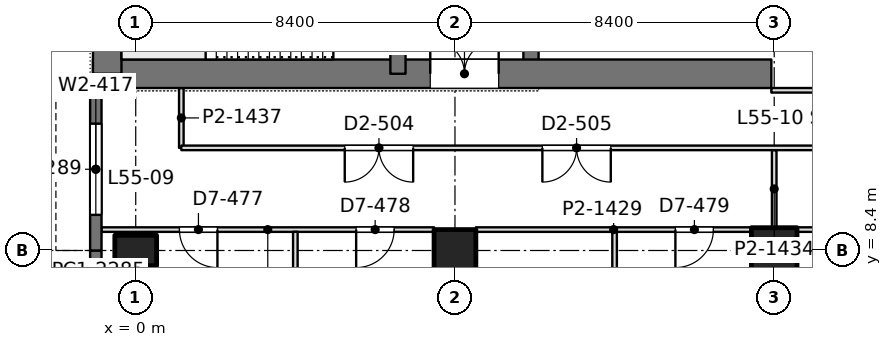
"""IFC4 building model, lengths in metres.
Left out: names, types, materials, properties, quantities, classifications, styles, units other than length and angle.
Written with IfcOpenShell. Run it as: python <this file> out.ifc"""

import sys

from ifc_helpers import new_model, si_unit, direction, frame, frame_2d, origin, origin_2d, place, context, subcontext, project, spatial, rectangle, extrude, element, fill, save


model = new_model("IFC4")
c1 = context("Model", 3, precision=1e-05, world=origin(), true_north=direction((0.0, 1.0)))
c2 = subcontext(c1, "Body", "Model", "MODEL_VIEW")
j1 = project(units=[si_unit("LENGTHUNIT", "METRE"), si_unit("PLANEANGLEUNIT", "RADIAN")], contexts=[c1])
p1 = place(None, origin())
s1 = spatial("IfcSite", under=j1, at=p1, CompositionType="ELEMENT")
p2 = place(p1, origin())
s2 = spatial("IfcBuilding", under=s1, at=p2, CompositionType="ELEMENT")
p3 = place(p2, frame((0.0, 0.0, 240.6)))
s3 = spatial("IfcBuildingStorey", under=s2, at=p3, CompositionType="ELEMENT", Elevation=240.6)
p4 = place(p3, frame((0.0, 8.4, 0.0), z_axis=(0.0, 0.0, 1.0), x_axis=(0.0, 1.0, 0.0)))
e1 = element("IfcColumn", 1, at=p4, inside=s3, PredefinedType="COLUMN", context=c2, shape_type="SweptSolid", body=[
    extrude(rectangle(XDim=0.8, YDim=1.1, at=origin_2d()), origin(), (0.0, 0.0, 1.0), 4.2),
])
p5 = place(p3, frame((8.4, 8.4, 0.0), z_axis=(0.0, 0.0, 1.0), x_axis=(1.0, 0.0, 0.0)))
e2 = element("IfcColumn", 2, at=p5, inside=s3, PredefinedType="COLUMN", context=c2, shape_type="SweptSolid", body=[
    extrude(rectangle(XDim=1.1, YDim=1.1, at=origin_2d()), origin(), (0.0, 0.0, 1.0), 4.2),
])
p6 = place(p3, frame((16.8, 8.4, 0.0), z_axis=(0.0, 0.0, 1.0), x_axis=(1.0, 0.0, 0.0)))
e3 = element("IfcColumn", 3, at=p6, inside=s3, PredefinedType="COLUMN", context=c2, shape_type="SweptSolid", body=[
    extrude(rectangle(XDim=1.2, YDim=1.2, at=origin_2d()), origin(), (0.0, 0.0, 1.0), 4.2),
])
p7 = place(p3, frame((-1.125, 13.05, 0.0), z_axis=(0.0, 0.0, 1.0), x_axis=(1.0, 0.0, 0.0)))
e4 = element("IfcWall", 4, at=p7, inside=s3, PredefinedType="SHEAR", context=c2, shape_type="SweptSolid", body=[
    extrude(rectangle(XDim=17.85, YDim=0.75, at=frame_2d((8.925, 0.0))), origin(), (0.0, 0.0, 1.0), 4.2),
])
p8 = place(p7, frame((8.875, 0.0, 0.0)))
e5 = element("IfcOpeningElement", 5, at=p8, cuts=e4, PredefinedType="OPENING", context=c2, shape_type="SweptSolid", body=[
    extrude(rectangle(XDim=1.8, YDim=2.4, at=frame_2d((0.9, 1.2))), frame((0.0, 0.385, 0.0), z_axis=(0.0, -1.0, 0.0), x_axis=(1.0, 0.0, 0.0)), (0.0, 0.0, 1.0), 0.77),
])
p9 = place(p3, frame((-0.75, 13.05, 0.0), z_axis=(0.0, 0.0, 1.0), x_axis=(0.0, 1.0, 0.0)))
e6 = element("IfcWall", 6, at=p9, inside=s3, PredefinedType="SHEAR", context=c2, shape_type="SweptSolid", body=[
    extrude(rectangle(XDim=24.3, YDim=0.75, at=frame_2d((12.15, 0.0))), origin(), (0.0, 0.0, 1.0), 4.2),
])
p10 = place(p3, frame((6.9, 13.05, 0.0), z_axis=(0.0, 0.0, 1.0), x_axis=(0.0, 1.0, 0.0)))
e7 = element("IfcWall", 7, at=p10, inside=s3, PredefinedType="SHEAR", context=c2, shape_type="SweptSolid", body=[
    extrude(rectangle(XDim=24.3, YDim=0.4, at=frame_2d((12.15, 0.0))), origin(), (0.0, 0.0, 1.0), 4.2),
])
p11 = place(p10, frame((1.3, 0.0, 0.0)))
e8 = element("IfcOpeningElement", 8, at=p11, cuts=e7, PredefinedType="OPENING", context=c2, shape_type="SweptSolid", body=[
    extrude(rectangle(XDim=1.0, YDim=2.2, at=frame_2d((0.5, 1.1))), frame((0.0, 0.21, 0.0), z_axis=(0.0, -1.0, 0.0), x_axis=(1.0, 0.0, 0.0)), (0.0, 0.0, 1.0), 0.42),
])
p12 = place(p10, frame((22.0, 0.0, 0.0)))
e9 = element("IfcOpeningElement", 9, at=p12, cuts=e7, PredefinedType="OPENING", context=c2, shape_type="SweptSolid", body=[
    extrude(rectangle(XDim=1.0, YDim=2.2, at=frame_2d((0.5, 1.1))), frame((0.0, 0.21, 0.0), z_axis=(0.0, -1.0, 0.0), x_axis=(1.0, 0.0, 0.0)), (0.0, 0.0, 1.0), 0.42),
])
p13 = place(p10, frame((5.55, 0.0, 0.0)))
e10 = element("IfcOpeningElement", 10, at=p13, cuts=e7, PredefinedType="OPENING", context=c2, shape_type="SweptSolid", body=[
    extrude(rectangle(XDim=1.0, YDim=2.2, at=frame_2d((0.5, 1.1))), frame((0.0, 0.21, 0.0), z_axis=(0.0, -1.0, 0.0), x_axis=(1.0, 0.0, 0.0)), (0.0, 0.0, 1.0), 0.42),
])
p14 = place(p10, frame((9.55, 0.0, 0.0)))
e11 = element("IfcOpeningElement", 11, at=p14, cuts=e7, PredefinedType="OPENING", context=c2, shape_type="SweptSolid", body=[
    extrude(rectangle(XDim=1.0, YDim=2.2, at=frame_2d((0.5, 1.1))), frame((0.0, 0.21, 0.0), z_axis=(0.0, -1.0, 0.0), x_axis=(1.0, 0.0, 0.0)), (0.0, 0.0, 1.0), 0.42),
])
p15 = place(p10, frame((12.8, 0.0, 0.0)))
e12 = element("IfcOpeningElement", 12, at=p15, cuts=e7, PredefinedType="OPENING", context=c2, shape_type="SweptSolid", body=[
    extrude(rectangle(XDim=1.1, YDim=2.2, at=frame_2d((0.55, 1.1))), frame((0.0, 0.21, 0.0), z_axis=(0.0, -1.0, 0.0), x_axis=(1.0, 0.0, 0.0)), (0.0, 0.0, 1.0), 0.42),
])
p16 = place(p10, frame((15.538, 0.0, 0.0)))
e13 = element("IfcOpeningElement", 13, at=p16, cuts=e7, PredefinedType="OPENING", context=c2, shape_type="SweptSolid", body=[
    extrude(rectangle(XDim=1.1, YDim=2.2, at=frame_2d((0.55, 1.1))), frame((0.0, 0.21, 0.0), z_axis=(0.0, -1.0, 0.0), x_axis=(1.0, 0.0, 0.0)), (0.0, 0.0, 1.0), 0.42),
])
p17 = place(p10, frame((18.262, 0.0, 0.0)))
e14 = element("IfcOpeningElement", 14, at=p17, cuts=e7, PredefinedType="OPENING", context=c2, shape_type="SweptSolid", body=[
    extrude(rectangle(XDim=1.1, YDim=2.2, at=frame_2d((0.55, 1.1))), frame((0.0, 0.21, 0.0), z_axis=(0.0, -1.0, 0.0), x_axis=(1.0, 0.0, 0.0)), (0.0, 0.0, 1.0), 0.42),
])
p18 = place(p3, frame((10.4, 13.05, 0.0), z_axis=(0.0, 0.0, 1.0), x_axis=(0.0, 1.0, 0.0)))
e15 = element("IfcWall", 15, at=p18, inside=s3, PredefinedType="SHEAR", context=c2, shape_type="SweptSolid", body=[
    extrude(rectangle(XDim=24.3, YDim=0.4, at=frame_2d((12.15, 0.0))), origin(), (0.0, 0.0, 1.0), 4.2),
])
p19 = place(p18, frame((15.75, 0.0, 0.0)))
e16 = element("IfcOpeningElement", 16, at=p19, cuts=e15, PredefinedType="OPENING", context=c2, shape_type="SweptSolid", body=[
    extrude(rectangle(XDim=1.1, YDim=2.2, at=frame_2d((0.55, 1.1))), frame((0.0, 0.21, 0.0), z_axis=(0.0, -1.0, 0.0), x_axis=(1.0, 0.0, 0.0)), (0.0, 0.0, 1.0), 0.42),
])
p20 = place(p18, frame((18.6, 0.0, 0.0)))
e17 = element("IfcOpeningElement", 17, at=p20, cuts=e15, PredefinedType="OPENING", context=c2, shape_type="SweptSolid", body=[
    extrude(rectangle(XDim=1.1, YDim=2.2, at=frame_2d((0.55, 1.1))), frame((0.0, 0.21, 0.0), z_axis=(0.0, -1.0, 0.0), x_axis=(1.0, 0.0, 0.0)), (0.0, 0.0, 1.0), 0.42),
])
p21 = place(p18, frame((21.45, 0.0, 0.0)))
e18 = element("IfcOpeningElement", 18, at=p21, cuts=e15, PredefinedType="OPENING", context=c2, shape_type="SweptSolid", body=[
    extrude(rectangle(XDim=1.1, YDim=2.2, at=frame_2d((0.55, 1.1))), frame((0.0, 0.21, 0.0), z_axis=(0.0, -1.0, 0.0), x_axis=(1.0, 0.0, 0.0)), (0.0, 0.0, 1.0), 0.42),
])
p22 = place(p18, frame((8.65, 0.0, 0.0)))
e19 = element("IfcOpeningElement", 19, at=p22, cuts=e15, PredefinedType="OPENING", context=c2, shape_type="SweptSolid", body=[
    extrude(rectangle(XDim=1.8, YDim=2.4, at=frame_2d((0.9, 1.2))), frame((0.0, 0.21, 0.0), z_axis=(0.0, -1.0, 0.0), x_axis=(1.0, 0.0, 0.0)), (0.0, 0.0, 1.0), 0.42),
])
p23 = place(p3, frame((-1.05, 5.915, 0.0), z_axis=(0.0, 0.0, 1.0), x_axis=(0.0, 1.0, 0.0)))
e20 = element("IfcWall", 20, at=p23, inside=s3, PredefinedType="SOLIDWALL", context=c2, shape_type="SweptSolid", body=[
    extrude(rectangle(XDim=2.485, YDim=0.3, at=frame_2d((1.243, 0.0))), origin(), (0.0, 0.0, 1.0), 4.0),
])
p24 = place(p3, frame((-1.05, 8.4, 0.0), z_axis=(0.0, 0.0, 1.0), x_axis=(0.0, 1.0, 0.0)))
e21 = element("IfcWall", 21, at=p24, inside=s3, PredefinedType="SOLIDWALL", context=c2, shape_type="SweptSolid", body=[
    extrude(rectangle(XDim=4.275, YDim=0.3, at=frame_2d((2.138, 0.0))), origin(), (0.0, 0.0, 1.0), 4.0),
])
p25 = place(p24, frame((0.938, 0.0, 0.9)))
e22 = element("IfcOpeningElement", 22, at=p25, cuts=e21, PredefinedType="OPENING", context=c2, shape_type="SweptSolid", body=[
    extrude(rectangle(XDim=2.4, YDim=1.9, at=frame_2d((1.2, 0.95))), frame((0.0, 0.16, 0.0), z_axis=(0.0, -1.0, 0.0), x_axis=(1.0, 0.0, 0.0)), (0.0, 0.0, 1.0), 0.32),
])
p26 = place(p3, frame((-0.902, 8.95, 0.0), z_axis=(0.0, 0.0, 1.0), x_axis=(1.0, 0.0, 0.0)))
e23 = element("IfcWall", 23, at=p26, inside=s3, PredefinedType="PARTITIONING", context=c2, shape_type="SweptSolid", body=[
    extrude(rectangle(XDim=8.753, YDim=0.12, at=frame_2d((4.376, 0.0))), origin(), (0.0, 0.0, 1.0), 3.62),
])
p27 = place(p26, frame((2.052, 0.0, 0.0)))
e24 = element("IfcOpeningElement", 24, at=p27, cuts=e23, PredefinedType="OPENING", context=c2, shape_type="SweptSolid", body=[
    extrude(rectangle(XDim=1.0, YDim=2.4, at=frame_2d((0.5, 1.2))), frame((0.0, 0.07, 0.0), z_axis=(0.0, -1.0, 0.0), x_axis=(1.0, 0.0, 0.0)), (0.0, 0.0, 1.0), 0.14),
])
p28 = place(p26, frame((6.702, 0.0, 0.0)))
e25 = element("IfcOpeningElement", 25, at=p28, cuts=e23, PredefinedType="OPENING", context=c2, shape_type="SweptSolid", body=[
    extrude(rectangle(XDim=1.0, YDim=2.4, at=frame_2d((0.5, 1.2))), frame((0.0, 0.07, 0.0), z_axis=(0.0, -1.0, 0.0), x_axis=(1.0, 0.0, 0.0)), (0.0, 0.0, 1.0), 0.14),
])
p29 = place(p3, frame((8.949, 8.95, 0.0), z_axis=(0.0, 0.0, 1.0), x_axis=(1.0, 0.0, 0.0)))
e26 = element("IfcWall", 26, at=p29, inside=s3, PredefinedType="PARTITIONING", context=c2, shape_type="SweptSolid", body=[
    extrude(rectangle(XDim=7.252, YDim=0.12, at=frame_2d((3.626, 0.0))), origin(), (0.0, 0.0, 1.0), 3.4),
])
p30 = place(p29, frame((5.251, 0.0, 0.0)))
e27 = element("IfcOpeningElement", 27, at=p30, cuts=e26, PredefinedType="OPENING", context=c2, shape_type="SweptSolid", body=[
    extrude(rectangle(XDim=1.0, YDim=2.4, at=frame_2d((0.5, 1.2))), frame((0.0, 0.07, 0.0), z_axis=(0.0, -1.0, 0.0), x_axis=(1.0, 0.0, 0.0)), (0.0, 0.0, 1.0), 0.14),
])
p31 = place(p3, frame((17.399, 8.95, 0.0), z_axis=(0.0, 0.0, 1.0), x_axis=(1.0, 0.0, 0.0)))
e28 = element("IfcWall", 28, at=p31, inside=s3, PredefinedType="PARTITIONING", context=c2, shape_type="SweptSolid", body=[
    extrude(rectangle(XDim=7.252, YDim=0.12, at=frame_2d((3.626, 0.0))), origin(), (0.0, 0.0, 1.0), 3.4),
])
p32 = place(p31, frame((4.801, 0.0, 0.0)))
e29 = element("IfcOpeningElement", 29, at=p32, cuts=e28, PredefinedType="OPENING", context=c2, shape_type="SweptSolid", body=[
    extrude(rectangle(XDim=1.8, YDim=2.2, at=frame_2d((0.9, 1.1))), frame((0.0, 0.07, 0.0), z_axis=(0.0, -1.0, 0.0), x_axis=(1.0, 0.0, 0.0)), (0.0, 0.0, 1.0), 0.14),
])
for number, where, z_axis, x_axis in (
    (30, (4.2, 4.7, 0.0), (0.0, 0.0, 1.0), (0.0, 1.0, 0.0)),
    (31, (12.6, 4.7, 0.0), (0.0, 0.0, 1.0), (0.0, 1.0, 0.0)),
):
    element("IfcWall", number, at=place(p3, frame(where, z_axis=z_axis, x_axis=x_axis)), inside=s3, PredefinedType="PARTITIONING", context=c2, shape_type="SweptSolid", body=[
        extrude(rectangle(XDim=4.192, YDim=0.12, at=frame_2d((2.096, 0.0))), origin(), (0.0, 0.0, 1.0), 3.3),
    ])
p33 = place(p3, frame((16.8, 8.999, 0.0), z_axis=(0.0, 0.0, 1.0), x_axis=(0.0, 1.0, 0.0)))
e32 = element("IfcWall", 32, at=p33, inside=s3, PredefinedType="PARTITIONING", context=c2, shape_type="SweptSolid", body=[
    extrude(rectangle(XDim=2.043, YDim=0.12, at=frame_2d((1.021, 0.0))), origin(), (0.0, 0.0, 1.0), 3.543),
])
p34 = place(p3, frame((1.2, 11.1, 0.0), z_axis=(0.0, 0.0, 1.0), x_axis=(1.0, 0.0, 0.0)))
e33 = element("IfcWall", 33, at=p34, inside=s3, PredefinedType="PARTITIONING", context=c2, shape_type="SweptSolid", body=[
    extrude(rectangle(XDim=41.452, YDim=0.12, at=frame_2d((20.726, 0.0))), origin(), (0.0, 0.0, 1.0), 3.3),
])
p35 = place(p34, frame((4.3, 0.0, 0.0)))
e34 = element("IfcOpeningElement", 34, at=p35, cuts=e33, PredefinedType="OPENING", context=c2, shape_type="SweptSolid", body=[
    extrude(rectangle(XDim=1.8, YDim=2.2, at=frame_2d((0.9, 1.1))), frame((0.0, 0.07, 0.0), z_axis=(0.0, -1.0, 0.0), x_axis=(1.0, 0.0, 0.0)), (0.0, 0.0, 1.0), 0.14),
])
p36 = place(p34, frame((9.5, 0.0, 0.0)))
e35 = element("IfcOpeningElement", 35, at=p36, cuts=e33, PredefinedType="OPENING", context=c2, shape_type="SweptSolid", body=[
    extrude(rectangle(XDim=1.8, YDim=2.2, at=frame_2d((0.9, 1.1))), frame((0.0, 0.07, 0.0), z_axis=(0.0, -1.0, 0.0), x_axis=(1.0, 0.0, 0.0)), (0.0, 0.0, 1.0), 0.14),
])
p37 = place(p34, frame((23.317, 0.0, 0.0)))
e36 = element("IfcOpeningElement", 36, at=p37, cuts=e33, PredefinedType="OPENING", context=c2, shape_type="SweptSolid", body=[
    extrude(rectangle(XDim=1.8, YDim=2.2, at=frame_2d((0.9, 1.1))), frame((0.0, 0.07, 0.0), z_axis=(0.0, -1.0, 0.0), x_axis=(1.0, 0.0, 0.0)), (0.0, 0.0, 1.0), 0.14),
])
p38 = place(p34, frame((33.0, 0.0, 0.0)))
e37 = element("IfcOpeningElement", 37, at=p38, cuts=e33, PredefinedType="OPENING", context=c2, shape_type="SweptSolid", body=[
    extrude(rectangle(XDim=1.8, YDim=2.2, at=frame_2d((0.9, 1.1))), frame((0.0, 0.07, 0.0), z_axis=(0.0, -1.0, 0.0), x_axis=(1.0, 0.0, 0.0)), (0.0, 0.0, 1.0), 0.14),
])
p39 = place(p3, frame((1.2, 11.1, 0.0), z_axis=(0.0, 0.0, 1.0), x_axis=(0.0, 1.0, 0.0)))
e38 = element("IfcWall", 38, at=p39, inside=s3, PredefinedType="PARTITIONING", context=c2, shape_type="SweptSolid", body=[
    extrude(rectangle(XDim=1.576, YDim=0.12, at=frame_2d((0.788, 0.0))), origin(), (0.0, 0.0, 1.0), 4.0),
])
p40 = place(p3, frame((16.725, 12.615, 0.0), z_axis=(0.0, 0.0, 1.0), x_axis=(1.0, 0.0, 0.0)))
e39 = element("IfcWall", 39, at=p40, inside=s3, PredefinedType="PARTITIONING", context=c2, shape_type="SweptSolid", body=[
    extrude(rectangle(XDim=16.95, YDim=0.12, at=frame_2d((8.475, 0.0))), origin(), (0.0, 0.0, 1.0), 3.3),
])
p41 = place(p40, frame((7.575, 0.0, 0.0)))
e40 = element("IfcOpeningElement", 40, at=p41, cuts=e39, PredefinedType="OPENING", context=c2, shape_type="SweptSolid", body=[
    extrude(rectangle(XDim=1.8, YDim=2.2, at=frame_2d((0.9, 1.1))), frame((0.0, 0.07, 0.0), z_axis=(0.0, -1.0, 0.0), x_axis=(1.0, 0.0, 0.0)), (0.0, 0.0, 1.0), 0.14),
])
p42 = place(p25, origin())
e41 = element("IfcWindow", 41, at=p42, inside=s3, PartitioningType="SINGLE_PANEL", PredefinedType="WINDOW", context=c2, shape_type="SweptSolid", body=[
    extrude(rectangle(XDim=2.4, YDim=1.9, at=frame_2d((1.2, 0.95))), frame((0.0, 0.03, 0.0), z_axis=(0.0, -1.0, 0.0), x_axis=(1.0, 0.0, 0.0)), (0.0, 0.0, 1.0), 0.06),
])
fill(e22, e41)
p43 = place(p8, origin())
e42 = element("IfcDoor", 42, at=p43, inside=s3, OperationType="DOUBLE_DOOR_SINGLE_SWING", PredefinedType="DOOR", context=c2, shape_type="SweptSolid", body=[
    extrude(rectangle(XDim=1.8, YDim=2.4, at=frame_2d((0.9, 1.2))), frame((0.0, 0.025, 0.0), z_axis=(0.0, -1.0, 0.0), x_axis=(1.0, 0.0, 0.0)), (0.0, 0.0, 1.0), 0.05),
])
fill(e5, e42)
p44 = place(p27, frame((1.0, 0.0, 0.0), z_axis=(0.0, 0.0, 1.0), x_axis=(-1.0, 0.0, 0.0)))
e43 = element("IfcDoor", 43, at=p44, inside=s3, OperationType="SINGLE_SWING_LEFT", PredefinedType="DOOR", context=c2, shape_type="SweptSolid", body=[
    extrude(rectangle(XDim=1.0, YDim=2.4, at=frame_2d((0.5, 1.2))), frame((0.0, 0.025, 0.0), z_axis=(0.0, -1.0, 0.0), x_axis=(1.0, 0.0, 0.0)), (0.0, 0.0, 1.0), 0.05),
])
fill(e24, e43)
p45 = place(p28, frame((1.0, 0.0, 0.0), z_axis=(0.0, 0.0, 1.0), x_axis=(-1.0, 0.0, 0.0)))
e44 = element("IfcDoor", 44, at=p45, inside=s3, OperationType="SINGLE_SWING_RIGHT", PredefinedType="DOOR", context=c2, shape_type="SweptSolid", body=[
    extrude(rectangle(XDim=1.0, YDim=2.4, at=frame_2d((0.5, 1.2))), frame((0.0, 0.025, 0.0), z_axis=(0.0, -1.0, 0.0), x_axis=(1.0, 0.0, 0.0)), (0.0, 0.0, 1.0), 0.05),
])
fill(e25, e44)
p46 = place(p30, frame((1.0, 0.0, 0.0), z_axis=(0.0, 0.0, 1.0), x_axis=(-1.0, 0.0, 0.0)))
e45 = element("IfcDoor", 45, at=p46, inside=s3, OperationType="SINGLE_SWING_RIGHT", PredefinedType="DOOR", context=c2, shape_type="SweptSolid", body=[
    extrude(rectangle(XDim=1.0, YDim=2.4, at=frame_2d((0.5, 1.2))), frame((0.0, 0.025, 0.0), z_axis=(0.0, -1.0, 0.0), x_axis=(1.0, 0.0, 0.0)), (0.0, 0.0, 1.0), 0.05),
])
fill(e27, e45)
p47 = place(p35, frame((1.8, 0.0, 0.0), z_axis=(0.0, 0.0, 1.0), x_axis=(-1.0, 0.0, 0.0)))
e46 = element("IfcDoor", 46, at=p47, inside=s3, OperationType="DOUBLE_DOOR_SINGLE_SWING", PredefinedType="DOOR", context=c2, shape_type="SweptSolid", body=[
    extrude(rectangle(XDim=1.8, YDim=2.2, at=frame_2d((0.9, 1.1))), frame((0.0, 0.025, 0.0), z_axis=(0.0, -1.0, 0.0), x_axis=(1.0, 0.0, 0.0)), (0.0, 0.0, 1.0), 0.05),
])
fill(e34, e46)
p48 = place(p36, frame((1.8, 0.0, 0.0), z_axis=(0.0, 0.0, 1.0), x_axis=(-1.0, 0.0, 0.0)))
e47 = element("IfcDoor", 47, at=p48, inside=s3, OperationType="DOUBLE_DOOR_SINGLE_SWING", PredefinedType="DOOR", context=c2, shape_type="SweptSolid", body=[
    extrude(rectangle(XDim=1.8, YDim=2.2, at=frame_2d((0.9, 1.1))), frame((0.0, 0.025, 0.0), z_axis=(0.0, -1.0, 0.0), x_axis=(1.0, 0.0, 0.0)), (0.0, 0.0, 1.0), 0.05),
])
fill(e35, e47)
save(model, sys.argv[1])
